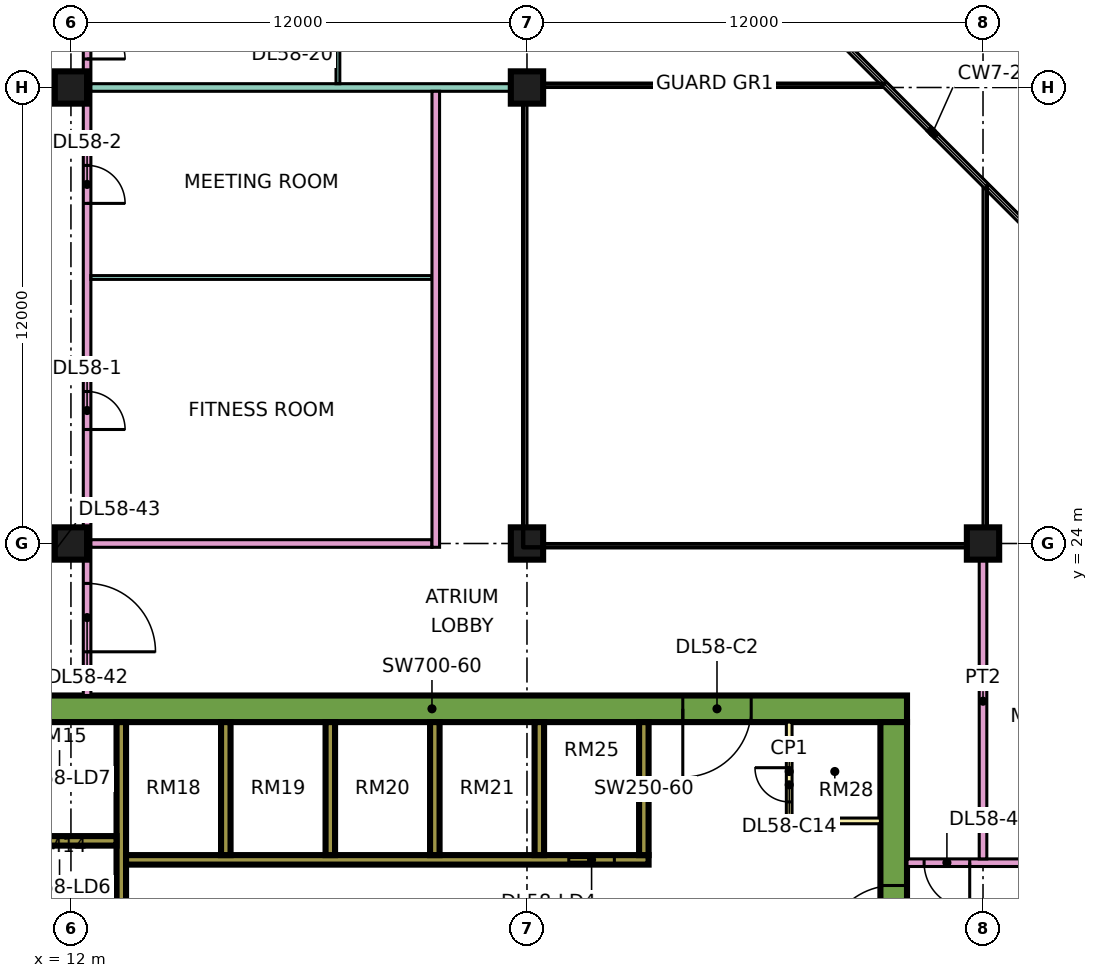
"""IFC4 building model, lengths in metres.
Left out: names, types, materials, properties, quantities, classifications, styles, units other than length and angle.
Written with IfcOpenShell. Run it as: python <this file> out.ifc"""

import sys

from ifc_helpers import new_model, si_unit, direction, frame, frame_2d, origin, origin_2d, place, context, subcontext, project, spatial, rectangle, extrude, element, fill, save


model = new_model("IFC4")
c1 = context("Model", 3, precision=1e-05, world=origin(), true_north=direction((0.0, 1.0)))
c2 = subcontext(c1, "Body", "Model", "MODEL_VIEW")
j1 = project(units=[si_unit("LENGTHUNIT", "METRE"), si_unit("PLANEANGLEUNIT", "RADIAN")], contexts=[c1])
p1 = place(None, origin())
s1 = spatial("IfcSite", under=j1, at=p1, CompositionType="ELEMENT")
p2 = place(p1, origin())
s2 = spatial("IfcBuilding", under=s1, at=p2, CompositionType="ELEMENT")
p3 = place(p2, frame((0.0, 0.0, 245.4)))
s3 = spatial("IfcBuildingStorey", under=s2, at=p3, CompositionType="ELEMENT", Elevation=245.4)
for number, where, z_axis, x_axis in (
    (1, (12.0, 24.0, 0.0), (0.0, 0.0, 1.0), (1.0, 0.0, 0.0)),
    (2, (12.0, 36.0, 0.0), (0.0, 0.0, 1.0), (1.0, 0.0, 0.0)),
    (3, (24.0, 24.0, 0.0), (0.0, 0.0, 1.0), (1.0, 0.0, 0.0)),
    (4, (24.0, 36.0, 0.0), (0.0, 0.0, 1.0), (1.0, 0.0, 0.0)),
    (5, (36.0, 24.0, 0.0), (0.0, 0.0, 1.0), (1.0, 0.0, 0.0)),
):
    element("IfcColumn", number, at=place(p3, frame(where, z_axis=z_axis, x_axis=x_axis)), inside=s3, PredefinedType="COLUMN", context=c2, shape_type="SweptSolid", body=[
        extrude(rectangle(XDim=0.85, YDim=0.85, at=origin_2d()), origin(), (0.0, 0.0, 1.0), 3.75),
    ])
p4 = place(p3, frame((9.0, 19.65, 0.0), z_axis=(0.0, 0.0, 1.0), x_axis=(1.0, 0.0, 0.0)))
e6 = element("IfcWall", 6, at=p4, inside=s3, PredefinedType="SHEAR", context=c2, shape_type="SweptSolid", body=[
    extrude(rectangle(XDim=25.0, YDim=0.7, at=frame_2d((12.5, 0.0))), origin(), (0.0, 0.0, 1.0), 3.75),
])
p5 = place(p4, frame((19.1, 0.0, 0.0)))
e7 = element("IfcOpeningElement", 7, at=p5, cuts=e6, PredefinedType="OPENING", context=c2, shape_type="SweptSolid", body=[
    extrude(rectangle(XDim=1.8, YDim=2.4, at=frame_2d((0.9, 1.2))), frame((0.0, 0.36, 0.0), z_axis=(0.0, -1.0, 0.0), x_axis=(1.0, 0.0, 0.0)), (0.0, 0.0, 1.0), 0.72),
])
p6 = place(p3, frame((33.65, 7.7, 0.0), z_axis=(0.0, 0.0, 1.0), x_axis=(0.0, 1.0, 0.0)))
e8 = element("IfcWall", 8, at=p6, inside=s3, PredefinedType="SHEAR", context=c2, shape_type="SweptSolid", body=[
    extrude(rectangle(XDim=11.6, YDim=0.7, at=frame_2d((5.8, 0.0))), origin(), (0.0, 0.0, 1.0), 3.75),
])
p7 = place(p6, frame((5.5, 0.0, 0.0)))
e9 = element("IfcOpeningElement", 9, at=p7, cuts=e8, PredefinedType="OPENING", context=c2, shape_type="SweptSolid", body=[
    extrude(rectangle(XDim=1.8, YDim=2.4, at=frame_2d((0.9, 1.2))), frame((0.0, 0.36, 0.0), z_axis=(0.0, -1.0, 0.0), x_axis=(1.0, 0.0, 0.0)), (0.0, 0.0, 1.0), 0.72),
])
p8 = place(p3, frame((13.325, 7.7, 0.0), z_axis=(0.0, 0.0, 1.0), x_axis=(0.0, 1.0, 0.0)))
e10 = element("IfcWall", 10, at=p8, inside=s3, PredefinedType="SHEAR", context=c2, shape_type="SweptSolid", body=[
    extrude(rectangle(XDim=11.6, YDim=0.25, at=frame_2d((5.8, 0.0))), origin(), (0.0, 0.0, 1.0), 3.75),
])
p9 = place(p3, frame((13.45, 15.675, 0.0), z_axis=(0.0, 0.0, 1.0), x_axis=(1.0, 0.0, 0.0)))
e11 = element("IfcWall", 11, at=p9, inside=s3, PredefinedType="SHEAR", context=c2, shape_type="SweptSolid", body=[
    extrude(rectangle(XDim=13.75, YDim=0.25, at=frame_2d((6.875, 0.0))), origin(), (0.0, 0.0, 1.0), 3.75),
])
p10 = place(p9, frame((11.65, 0.0, 0.0)))
e12 = element("IfcOpeningElement", 12, at=p10, cuts=e11, PredefinedType="OPENING", context=c2, shape_type="SweptSolid", body=[
    extrude(rectangle(XDim=1.2, YDim=2.2, at=frame_2d((0.6, 1.1))), frame((0.0, 0.135, 0.0), z_axis=(0.0, -1.0, 0.0), x_axis=(1.0, 0.0, 0.0)), (0.0, 0.0, 1.0), 0.27),
])
p11 = place(p3, frame((10.2, 16.175, 0.0), z_axis=(0.0, 0.0, 1.0), x_axis=(1.0, 0.0, 0.0)))
e13 = element("IfcWall", 13, at=p11, inside=s3, PredefinedType="SHEAR", context=c2, shape_type="SweptSolid", body=[
    extrude(rectangle(XDim=3.0, YDim=0.25, at=frame_2d((1.5, 0.0))), origin(), (0.0, 0.0, 1.0), 3.75),
])
for number, where, z_axis, x_axis in (
    (14, (16.075, 15.8, 0.0), (0.0, 0.0, 1.0), (0.0, 1.0, 0.0)),
    (15, (18.825, 15.8, 0.0), (0.0, 0.0, 1.0), (0.0, 1.0, 0.0)),
    (16, (21.575, 15.8, 0.0), (0.0, 0.0, 1.0), (0.0, 1.0, 0.0)),
    (17, (24.325, 15.8, 0.0), (0.0, 0.0, 1.0), (0.0, 1.0, 0.0)),
    (18, (27.075, 15.8, 0.0), (0.0, 0.0, 1.0), (0.0, 1.0, 0.0)),
):
    element("IfcWall", number, at=place(p3, frame(where, z_axis=z_axis, x_axis=x_axis)), inside=s3, PredefinedType="SHEAR", context=c2, shape_type="SweptSolid", body=[
        extrude(rectangle(XDim=3.5, YDim=0.25, at=frame_2d((1.75, 0.0))), origin(), (0.0, 0.0, 1.0), 3.75),
    ])
p12 = place(p3, frame((30.9, 16.7, 0.0), z_axis=(0.0, 0.0, 1.0), x_axis=(0.0, 1.0, 0.0)))
e19 = element("IfcWall", 19, at=p12, inside=s3, PredefinedType="PARTITIONING", context=c2, shape_type="SweptSolid", body=[
    extrude(rectangle(XDim=2.6, YDim=0.15, at=frame_2d((1.3, 0.0))), origin(), (0.0, 0.0, 1.0), 3.35),
])
p13 = place(p12, frame((0.5, 0.0, 0.0)))
e20 = element("IfcOpeningElement", 20, at=p13, cuts=e19, PredefinedType="OPENING", context=c2, shape_type="SweptSolid", body=[
    extrude(rectangle(XDim=0.9, YDim=2.1, at=frame_2d((0.45, 1.05))), frame((0.0, 0.085, 0.0), z_axis=(0.0, -1.0, 0.0), x_axis=(1.0, 0.0, 0.0)), (0.0, 0.0, 1.0), 0.17),
])
p14 = place(p3, frame((30.9, 16.7, 0.0), z_axis=(0.0, 0.0, 1.0), x_axis=(1.0, 0.0, 0.0)))
e21 = element("IfcWall", 21, at=p14, inside=s3, PredefinedType="PARTITIONING", context=c2, shape_type="SweptSolid", body=[
    extrude(rectangle(XDim=2.4, YDim=0.15, at=frame_2d((1.2, 0.0))), origin(), (0.0, 0.0, 1.0), 3.35),
])
p15 = place(p3, frame((12.425, 20.0, 0.0), z_axis=(0.0, 0.0, 1.0), x_axis=(0.0, 1.0, 0.0)))
e22 = element("IfcWall", 22, at=p15, inside=s3, PredefinedType="PARTITIONING", context=c2, shape_type="SweptSolid", body=[
    extrude(rectangle(XDim=42.926, YDim=0.2, at=frame_2d((21.463, 0.0))), origin(), (0.0, 0.0, 1.0), 3.35),
])
p16 = place(p15, frame((7.0, 0.0, 0.0)))
e23 = element("IfcOpeningElement", 23, at=p16, cuts=e22, PredefinedType="OPENING", context=c2, shape_type="SweptSolid", body=[
    extrude(rectangle(XDim=1.0, YDim=2.1, at=frame_2d((0.5, 1.05))), frame((0.0, 0.11, 0.0), z_axis=(0.0, -1.0, 0.0), x_axis=(1.0, 0.0, 0.0)), (0.0, 0.0, 1.0), 0.22),
])
p17 = place(p15, frame((12.95, 0.0, 0.0)))
e24 = element("IfcOpeningElement", 24, at=p17, cuts=e22, PredefinedType="OPENING", context=c2, shape_type="SweptSolid", body=[
    extrude(rectangle(XDim=1.0, YDim=2.1, at=frame_2d((0.5, 1.05))), frame((0.0, 0.11, 0.0), z_axis=(0.0, -1.0, 0.0), x_axis=(1.0, 0.0, 0.0)), (0.0, 0.0, 1.0), 0.22),
])
p18 = place(p15, frame((16.75, 0.0, 0.0)))
e25 = element("IfcOpeningElement", 25, at=p18, cuts=e22, PredefinedType="OPENING", context=c2, shape_type="SweptSolid", body=[
    extrude(rectangle(XDim=1.0, YDim=2.1, at=frame_2d((0.5, 1.05))), frame((0.0, 0.11, 0.0), z_axis=(0.0, -1.0, 0.0), x_axis=(1.0, 0.0, 0.0)), (0.0, 0.0, 1.0), 0.22),
])
p19 = place(p15, frame((34.9, 0.0, 0.0)))
e26 = element("IfcOpeningElement", 26, at=p19, cuts=e22, PredefinedType="OPENING", context=c2, shape_type="SweptSolid", body=[
    extrude(rectangle(XDim=1.0, YDim=2.1, at=frame_2d((0.5, 1.05))), frame((0.0, 0.11, 0.0), z_axis=(0.0, -1.0, 0.0), x_axis=(1.0, 0.0, 0.0)), (0.0, 0.0, 1.0), 0.22),
])
p20 = place(p15, frame((1.15, 0.0, 0.0)))
e27 = element("IfcOpeningElement", 27, at=p20, cuts=e22, PredefinedType="OPENING", context=c2, shape_type="SweptSolid", body=[
    extrude(rectangle(XDim=1.8, YDim=2.1, at=frame_2d((0.9, 1.05))), frame((0.0, 0.11, 0.0), z_axis=(0.0, -1.0, 0.0), x_axis=(1.0, 0.0, 0.0)), (0.0, 0.0, 1.0), 0.22),
])
p21 = place(p15, frame((28.6, 0.0, 0.0)))
e28 = element("IfcOpeningElement", 28, at=p21, cuts=e22, PredefinedType="OPENING", context=c2, shape_type="SweptSolid", body=[
    extrude(rectangle(XDim=1.8, YDim=2.1, at=frame_2d((0.9, 1.05))), frame((0.0, 0.11, 0.0), z_axis=(0.0, -1.0, 0.0), x_axis=(1.0, 0.0, 0.0)), (0.0, 0.0, 1.0), 0.22),
])
p22 = place(p3, frame((12.525, 24.0, 0.0), z_axis=(0.0, 0.0, 1.0), x_axis=(1.0, 0.0, 0.0)))
e29 = element("IfcWall", 29, at=p22, inside=s3, PredefinedType="PARTITIONING", context=c2, shape_type="SweptSolid", body=[
    extrude(rectangle(XDim=8.975, YDim=0.2, at=frame_2d((4.488, 0.0))), origin(), (0.0, 0.0, 1.0), 3.35),
])
p23 = place(p3, frame((12.525, 31.0, 0.0), z_axis=(0.0, 0.0, 1.0), x_axis=(1.0, 0.0, 0.0)))
e30 = element("IfcWall", 30, at=p23, inside=s3, PredefinedType="PARTITIONING", context=c2, shape_type="SweptSolid", body=[
    extrude(rectangle(XDim=8.975, YDim=0.1, at=frame_2d((4.488, 0.0))), origin(), (0.0, 0.0, 1.0), 3.35),
])
p24 = place(p3, frame((12.525, 36.0, 0.0), z_axis=(0.0, 0.0, 1.0), x_axis=(1.0, 0.0, 0.0)))
e31 = element("IfcWall", 31, at=p24, inside=s3, PredefinedType="PARTITIONING", context=c2, shape_type="SweptSolid", body=[
    extrude(rectangle(XDim=11.475, YDim=0.2, at=frame_2d((5.738, 0.0))), origin(), (0.0, 0.0, 1.0), 3.35),
])
p25 = place(p3, frame((19.025, 36.1, 0.0), z_axis=(0.0, 0.0, 1.0), x_axis=(0.0, 1.0, 0.0)))
e32 = element("IfcWall", 32, at=p25, inside=s3, PredefinedType="PARTITIONING", context=c2, shape_type="SweptSolid", body=[
    extrude(rectangle(XDim=2.85, YDim=0.1, at=frame_2d((1.425, 0.0))), origin(), (0.0, 0.0, 1.0), 3.35),
])
p26 = place(p25, frame((0.95, 0.0, 0.0)))
e33 = element("IfcOpeningElement", 33, at=p26, cuts=e32, PredefinedType="OPENING", context=c2, shape_type="SweptSolid", body=[
    extrude(rectangle(XDim=0.9, YDim=2.1, at=frame_2d((0.45, 1.05))), frame((0.0, 0.06, 0.0), z_axis=(0.0, -1.0, 0.0), x_axis=(1.0, 0.0, 0.0)), (0.0, 0.0, 1.0), 0.12),
])
p27 = place(p3, frame((21.6, 23.9, 0.0), z_axis=(0.0, 0.0, 1.0), x_axis=(0.0, 1.0, 0.0)))
e34 = element("IfcWall", 34, at=p27, inside=s3, PredefinedType="PARTITIONING", context=c2, shape_type="SweptSolid", body=[
    extrude(rectangle(XDim=12.0, YDim=0.2, at=frame_2d((6.0, 0.0))), origin(), (0.0, 0.0, 1.0), 3.35),
])
p28 = place(p3, frame((34.0, 15.6, 0.0), z_axis=(0.0, 0.0, 1.0), x_axis=(1.0, 0.0, 0.0)))
e35 = element("IfcWall", 35, at=p28, inside=s3, PredefinedType="PARTITIONING", context=c2, shape_type="SweptSolid", body=[
    extrude(rectangle(XDim=10.35, YDim=0.2, at=frame_2d((5.175, 0.0))), origin(), (0.0, 0.0, 1.0), 3.35),
])
p29 = place(p28, frame((5.6, 0.0, 0.0)))
e36 = element("IfcOpeningElement", 36, at=p29, cuts=e35, PredefinedType="OPENING", context=c2, shape_type="SweptSolid", body=[
    extrude(rectangle(XDim=1.0, YDim=2.1, at=frame_2d((0.5, 1.05))), frame((0.0, 0.11, 0.0), z_axis=(0.0, -1.0, 0.0), x_axis=(1.0, 0.0, 0.0)), (0.0, 0.0, 1.0), 0.22),
])
p30 = place(p28, frame((0.45, 0.0, 0.0)))
e37 = element("IfcOpeningElement", 37, at=p30, cuts=e35, PredefinedType="OPENING", context=c2, shape_type="SweptSolid", body=[
    extrude(rectangle(XDim=1.2, YDim=2.1, at=frame_2d((0.6, 1.05))), frame((0.0, 0.11, 0.0), z_axis=(0.0, -1.0, 0.0), x_axis=(1.0, 0.0, 0.0)), (0.0, 0.0, 1.0), 0.22),
])
p31 = place(p3, frame((36.0, 15.7, 0.0), z_axis=(0.0, 0.0, 1.0), x_axis=(0.0, 1.0, 0.0)))
e38 = element("IfcWall", 38, at=p31, inside=s3, PredefinedType="PARTITIONING", context=c2, shape_type="SweptSolid", body=[
    extrude(rectangle(XDim=8.3, YDim=0.2, at=frame_2d((4.15, 0.0))), origin(), (0.0, 0.0, 1.0), 3.35),
])
p32 = place(p10, origin())
e39 = element("IfcDoor", 39, at=p32, inside=s3, OperationType="DOUBLE_DOOR_SLIDING", PredefinedType="DOOR", context=c2, shape_type="SweptSolid", body=[
    extrude(rectangle(XDim=1.2, YDim=2.2, at=frame_2d((0.6, 1.1))), frame((0.0, 0.025, 0.0), z_axis=(0.0, -1.0, 0.0), x_axis=(1.0, 0.0, 0.0)), (0.0, 0.0, 1.0), 0.05),
])
fill(e12, e39)
p33 = place(p7, origin())
e40 = element("IfcDoor", 40, at=p33, inside=s3, OperationType="DOUBLE_DOOR_SINGLE_SWING", PredefinedType="DOOR", context=c2, shape_type="SweptSolid", body=[
    extrude(rectangle(XDim=1.8, YDim=2.4, at=frame_2d((0.9, 1.2))), frame((0.0, 0.025, 0.0), z_axis=(0.0, -1.0, 0.0), x_axis=(1.0, 0.0, 0.0)), (0.0, 0.0, 1.0), 0.05),
])
fill(e9, e40)
p34 = place(p5, frame((1.8, 0.0, 0.0), z_axis=(0.0, 0.0, 1.0), x_axis=(-1.0, 0.0, 0.0)))
e41 = element("IfcDoor", 41, at=p34, inside=s3, OperationType="DOUBLE_DOOR_SINGLE_SWING", PredefinedType="DOOR", context=c2, shape_type="SweptSolid", body=[
    extrude(rectangle(XDim=1.8, YDim=2.4, at=frame_2d((0.9, 1.2))), frame((0.0, 0.025, 0.0), z_axis=(0.0, -1.0, 0.0), x_axis=(1.0, 0.0, 0.0)), (0.0, 0.0, 1.0), 0.05),
])
fill(e7, e41)
p35 = place(p13, frame((0.9, 0.0, 0.0), z_axis=(0.0, 0.0, 1.0), x_axis=(-1.0, 0.0, 0.0)))
e42 = element("IfcDoor", 42, at=p35, inside=s3, OperationType="SINGLE_SWING_RIGHT", PredefinedType="DOOR", context=c2, shape_type="SweptSolid", body=[
    extrude(rectangle(XDim=0.9, YDim=2.1, at=frame_2d((0.45, 1.05))), frame((0.0, 0.025, 0.0), z_axis=(0.0, -1.0, 0.0), x_axis=(1.0, 0.0, 0.0)), (0.0, 0.0, 1.0), 0.05),
])
fill(e20, e42)
p36 = place(p16, frame((1.0, 0.0, 0.0), z_axis=(0.0, 0.0, 1.0), x_axis=(-1.0, 0.0, 0.0)))
e43 = element("IfcDoor", 43, at=p36, inside=s3, OperationType="SINGLE_SWING_LEFT", PredefinedType="DOOR", context=c2, shape_type="SweptSolid", body=[
    extrude(rectangle(XDim=1.0, YDim=2.1, at=frame_2d((0.5, 1.05))), frame((0.0, 0.025, 0.0), z_axis=(0.0, -1.0, 0.0), x_axis=(1.0, 0.0, 0.0)), (0.0, 0.0, 1.0), 0.05),
])
fill(e23, e43)
p37 = place(p17, frame((1.0, 0.0, 0.0), z_axis=(0.0, 0.0, 1.0), x_axis=(-1.0, 0.0, 0.0)))
e44 = element("IfcDoor", 44, at=p37, inside=s3, OperationType="SINGLE_SWING_LEFT", PredefinedType="DOOR", context=c2, shape_type="SweptSolid", body=[
    extrude(rectangle(XDim=1.0, YDim=2.1, at=frame_2d((0.5, 1.05))), frame((0.0, 0.025, 0.0), z_axis=(0.0, -1.0, 0.0), x_axis=(1.0, 0.0, 0.0)), (0.0, 0.0, 1.0), 0.05),
])
fill(e24, e44)
p38 = place(p18, frame((1.0, 0.0, 0.0), z_axis=(0.0, 0.0, 1.0), x_axis=(-1.0, 0.0, 0.0)))
e45 = element("IfcDoor", 45, at=p38, inside=s3, OperationType="SINGLE_SWING_LEFT", PredefinedType="DOOR", context=c2, shape_type="SweptSolid", body=[
    extrude(rectangle(XDim=1.0, YDim=2.1, at=frame_2d((0.5, 1.05))), frame((0.0, 0.025, 0.0), z_axis=(0.0, -1.0, 0.0), x_axis=(1.0, 0.0, 0.0)), (0.0, 0.0, 1.0), 0.05),
])
fill(e25, e45)
p39 = place(p30, origin())
e46 = element("IfcDoor", 46, at=p39, inside=s3, OperationType="SINGLE_SWING_RIGHT", PredefinedType="DOOR", context=c2, shape_type="SweptSolid", body=[
    extrude(rectangle(XDim=1.2, YDim=2.1, at=frame_2d((0.6, 1.05))), frame((0.0, 0.025, 0.0), z_axis=(0.0, -1.0, 0.0), x_axis=(1.0, 0.0, 0.0)), (0.0, 0.0, 1.0), 0.05),
])
fill(e37, e46)
p40 = place(p20, frame((1.8, 0.0, 0.0), z_axis=(0.0, 0.0, 1.0), x_axis=(-1.0, 0.0, 0.0)))
e47 = element("IfcDoor", 47, at=p40, inside=s3, OperationType="DOUBLE_DOOR_SINGLE_SWING", PredefinedType="DOOR", context=c2, shape_type="SweptSolid", body=[
    extrude(rectangle(XDim=1.8, YDim=2.1, at=frame_2d((0.9, 1.05))), frame((0.0, 0.025, 0.0), z_axis=(0.0, -1.0, 0.0), x_axis=(1.0, 0.0, 0.0)), (0.0, 0.0, 1.0), 0.05),
])
fill(e27, e47)
save(model, sys.argv[1])
